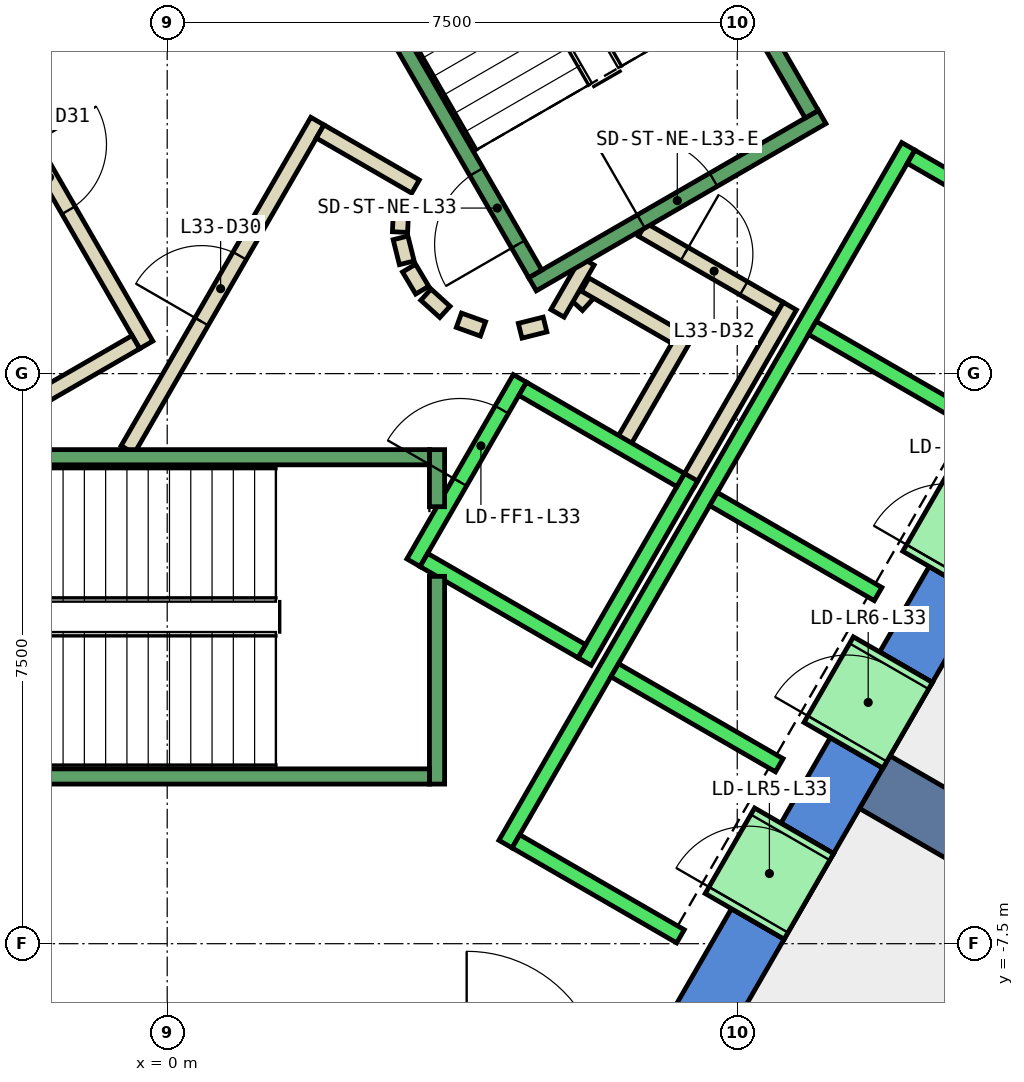
"""IFC4 building model, lengths in metres.
Left out: names, types, materials, properties, quantities, classifications, styles, units other than length and angle.
Written with IfcOpenShell. Run it as: python <this file> out.ifc"""

import sys

from ifc_helpers import new_model, si_unit, direction, frame, frame_2d, origin, place, context, subcontext, project, spatial, polyline, rectangle, outline, extrude, element, fill, save


model = new_model("IFC4")
c1 = context("Model", 3, precision=1e-05, world=origin(), true_north=direction((0.0, 1.0)))
c2 = subcontext(c1, "Body", "Model", "MODEL_VIEW")
j1 = project(units=[si_unit("LENGTHUNIT", "METRE"), si_unit("PLANEANGLEUNIT", "RADIAN")], contexts=[c1])
p1 = place(None, origin())
s1 = spatial("IfcSite", under=j1, at=p1, CompositionType="ELEMENT")
p2 = place(p1, origin())
s2 = spatial("IfcBuilding", under=s1, at=p2, CompositionType="ELEMENT")
p3 = place(p2, frame((0.0, 0.0, 150.8)))
s3 = spatial("IfcBuildingStorey", under=s2, at=p3, CompositionType="ELEMENT", Elevation=150.8)
p4 = place(p3, frame((0.0, 0.0, -0.4)))
e1 = element("IfcWall", 1, at=p4, inside=s3, PredefinedType="SHEAR", context=c2, shape_type="SweptSolid", body=[
    extrude(outline(polyline([(8.517, 11.748), (7.824, 11.348), (12.933, 2.5), (13.856, 2.5), (8.517, 11.748)])), origin(), (0.0, 0.0, 1.0), 4.2),
])
p5 = place(p3, frame((0.0, 0.0, -0.4)))
e2 = element("IfcWall", 2, at=p5, inside=s3, PredefinedType="SHEAR", context=c2, shape_type="SweptSolid", body=[
    extrude(outline(polyline([(8.117, -7.44), (7.424, -7.04), (6.466, -8.7), (6.928, -9.5), (8.117, -7.44)])), origin(), (0.0, 0.0, 1.0), 4.2),
])
p6 = place(p3, frame((0.0, 0.0, -0.4)))
e3 = element("IfcWall", 3, at=p6, inside=s3, PredefinedType="SHEAR", context=c2, shape_type="SweptSolid", body=[
    extrude(outline(polyline([(9.417, -5.189), (8.724, -4.789), (8.075, -5.914), (8.767, -6.314), (9.417, -5.189)])), origin(), (0.0, 0.0, 1.0), 4.2),
])
p7 = place(p3, frame((0.0, 0.0, -0.4)))
e4 = element("IfcWall", 4, at=p7, inside=s3, PredefinedType="SHEAR", context=c2, shape_type="SweptSolid", body=[
    extrude(outline(polyline([(10.717, -2.937), (10.025, -2.537), (9.374, -3.663), (10.067, -4.063), (10.717, -2.937)])), origin(), (0.0, 0.0, 1.0), 4.2),
])
p8 = place(p3, frame((0.0, 0.0, 3.6)))
e5 = element("IfcWall", 5, at=p8, inside=s3, PredefinedType="SHEAR", context=c2, shape_type="SweptSolid", body=[
    extrude(outline(polyline([(8.767, -6.314), (8.075, -5.914), (7.424, -7.04), (8.117, -7.44), (8.767, -6.314)])), origin(), (0.0, 0.0, 1.0), 0.2),
])
p9 = place(p3, frame((0.0, 0.0, 3.6)))
e6 = element("IfcWall", 6, at=p9, inside=s3, PredefinedType="SHEAR", context=c2, shape_type="SweptSolid", body=[
    extrude(outline(polyline([(10.067, -4.063), (9.374, -3.663), (8.724, -4.789), (9.417, -5.189), (10.067, -4.063)])), origin(), (0.0, 0.0, 1.0), 0.2),
])
p10 = place(p3, frame((0.0, 0.0, 3.6)))
e7 = element("IfcWall", 7, at=p10, inside=s3, PredefinedType="SHEAR", context=c2, shape_type="SweptSolid", body=[
    extrude(outline(polyline([(11.367, -1.811), (10.675, -1.411), (10.025, -2.537), (10.717, -2.937), (11.367, -1.811)])), origin(), (0.0, 0.0, 1.0), 0.2),
])
p11 = place(p3, frame((9.31, -5.375, -0.4), z_axis=(0.0, 0.0, 1.0), x_axis=(0.866017533419, -0.500013631625, 0.0)))
e8 = element("IfcWall", 8, at=p11, inside=s3, PredefinedType="SHEAR", context=c2, shape_type="SweptSolid", body=[
    extrude(rectangle(XDim=9.0, YDim=0.8, at=frame_2d((4.5, 0.0))), origin(), (0.0, 0.0, 1.0), 4.2),
])
p12 = place(p3, frame((5.39, 0.898, 0.0), z_axis=(0.0, 0.0, 1.0), x_axis=(0.673828488714, 0.738887791073, 0.0)))
e9 = element("IfcWall", 9, at=p12, inside=s3, PredefinedType="PARTITIONING", context=c2, shape_type="SweptSolid", body=[
    extrude(rectangle(XDim=0.263, YDim=0.2, at=frame_2d((0.131, 0.0))), origin(), (0.0, 0.0, 1.0), 3.8),
])
p13 = place(p3, frame((5.499, 1.172, 0.0), z_axis=(0.0, 0.0, 1.0), x_axis=(0.866333505267, -0.499465972466, 0.0)))
e10 = element("IfcWall", 10, at=p13, inside=s3, PredefinedType="PARTITIONING", context=c2, shape_type="SweptSolid", body=[
    extrude(rectangle(XDim=1.374, YDim=0.2, at=frame_2d((0.687, 0.0))), origin(), (0.0, 0.0, 1.0), 3.8),
])
p14 = place(p3, frame((6.826, 0.522, 0.0), z_axis=(0.0, 0.0, 1.0), x_axis=(-0.500016722714, -0.866015748706, 0.0)))
e11 = element("IfcWall", 11, at=p14, inside=s3, PredefinedType="PARTITIONING", context=c2, shape_type="SweptSolid", body=[
    extrude(rectangle(XDim=1.7, YDim=0.2, at=frame_2d((0.85, 0.0))), origin(), (0.0, 0.0, 1.0), 3.8),
])
p15 = place(p3, frame((6.25, 1.894, 0.0), z_axis=(0.0, 0.0, 1.0), x_axis=(0.866043184279, -0.499969202016, 0.0)))
e12 = element("IfcWall", 12, at=p15, inside=s3, PredefinedType="PARTITIONING", context=c2, shape_type="SweptSolid", body=[
    extrude(rectangle(XDim=2.084, YDim=0.2, at=frame_2d((1.042, 0.0))), origin(), (0.0, 0.0, 1.0), 3.8),
])
p16 = place(p15, frame((0.642, 0.0, 0.0)))
e13 = element("IfcOpeningElement", 13, at=p16, cuts=e12, PredefinedType="OPENING", context=c2, shape_type="SweptSolid", body=[
    extrude(rectangle(XDim=0.9, YDim=2.1, at=frame_2d((0.45, 1.05))), frame((0.0, 0.11, 0.0), z_axis=(0.0, -1.0, 0.0), x_axis=(1.0, 0.0, 0.0)), (0.0, 0.0, 1.0), 0.22),
])
p17 = place(p3, frame((8.192, 0.888, 0.0), z_axis=(0.0, 0.0, 1.0), x_axis=(-0.499940625693, -0.866059680843, 0.0)))
e14 = element("IfcWall", 14, at=p17, inside=s3, PredefinedType="PARTITIONING", context=c2, shape_type="SweptSolid", body=[
    extrude(rectangle(XDim=2.68, YDim=0.2, at=frame_2d((1.34, 0.0))), origin(), (0.0, 0.0, 1.0), 3.8),
])
p18 = place(p3, frame((5.135, 0.793, 0.0), z_axis=(0.0, 0.0, 1.0), x_axis=(0.499526442893, 0.866298639529, 0.0)))
e15 = element("IfcWall", 15, at=p18, inside=s3, PredefinedType="PARTITIONING", context=c2, shape_type="SweptSolid", body=[
    extrude(rectangle(XDim=0.791, YDim=0.2, at=frame_2d((0.396, 0.0))), origin(), (0.0, 0.0, 1.0), 3.8),
])
p19 = place(p3, frame((-0.52, -1.0, 0.0), z_axis=(0.0, 0.0, 1.0), x_axis=(0.50011622646, 0.865958290007, 0.0)))
e16 = element("IfcWall", 16, at=p19, inside=s3, PredefinedType="PARTITIONING", context=c2, shape_type="SweptSolid", body=[
    extrude(rectangle(XDim=4.991, YDim=0.2, at=frame_2d((2.496, 0.0))), origin(), (0.0, 0.0, 1.0), 3.8),
])
p20 = place(p19, frame((1.945, 0.0, 0.0)))
e17 = element("IfcOpeningElement", 17, at=p20, cuts=e16, PredefinedType="OPENING", context=c2, shape_type="SweptSolid", body=[
    extrude(rectangle(XDim=1.0, YDim=2.1, at=frame_2d((0.5, 1.05))), frame((0.0, 0.11, 0.0), z_axis=(0.0, -1.0, 0.0), x_axis=(1.0, 0.0, 0.0)), (0.0, 0.0, 1.0), 0.22),
])
p21 = place(p3, frame((2.012, 3.186, 0.0), z_axis=(0.0, 0.0, 1.0), x_axis=(0.865891012941, -0.500232699559, 0.0)))
e18 = element("IfcWall", 18, at=p21, inside=s3, PredefinedType="PARTITIONING", context=c2, shape_type="SweptSolid", body=[
    extrude(rectangle(XDim=1.449, YDim=0.2, at=frame_2d((0.725, 0.0))), origin(), (0.0, 0.0, 1.0), 3.8),
])
p22 = place(p3, frame((3.079, 2.199, 0.0), z_axis=(0.0, 0.0, 1.0), x_axis=(-0.047771483479, -0.998858290933, 0.0)))
e19 = element("IfcWall", 19, at=p22, inside=s3, PredefinedType="PARTITIONING", context=c2, shape_type="SweptSolid", body=[
    extrude(rectangle(XDim=0.337, YDim=0.2, at=frame_2d((0.169, 0.0))), origin(), (0.0, 0.0, 1.0), 3.8),
])
p23 = place(p3, frame((3.07, 1.786, 0.0), z_axis=(0.0, 0.0, 1.0), x_axis=(0.242705583207, -0.970099994784, 0.0)))
e20 = element("IfcWall", 20, at=p23, inside=s3, PredefinedType="PARTITIONING", context=c2, shape_type="SweptSolid", body=[
    extrude(rectangle(XDim=0.338, YDim=0.2, at=frame_2d((0.169, 0.0))), origin(), (0.0, 0.0, 1.0), 3.8),
])
for number, where, z_axis, x_axis in (
    (21, (3.182, 1.388, 0.0), (0.0, 0.0, 1.0), (0.512, -0.859, 0.0)),
    (22, (3.404, 1.039, 0.0), (0.0, 0.0, 1.0), (0.74, -0.672, 0.0)),
):
    element("IfcWall", number, at=place(p3, frame(where, z_axis=z_axis, x_axis=x_axis)), inside=s3, PredefinedType="PARTITIONING", context=c2, shape_type="SweptSolid", body=[
        extrude(rectangle(XDim=0.338, YDim=0.2, at=frame_2d((0.169, 0.0))), origin(), (0.0, 0.0, 1.0), 3.8),
    ])
p24 = place(p3, frame((3.838, 0.702, 0.0), z_axis=(0.0, 0.0, 1.0), x_axis=(0.941035081519, -0.338308993895, 0.0)))
e23 = element("IfcWall", 23, at=p24, inside=s3, PredefinedType="PARTITIONING", context=c2, shape_type="SweptSolid", body=[
    extrude(rectangle(XDim=0.337, YDim=0.2, at=frame_2d((0.168, 0.0))), origin(), (0.0, 0.0, 1.0), 3.8),
])
p25 = place(p3, frame((4.644, 0.564, 0.0), z_axis=(0.0, 0.0, 1.0), x_axis=(0.969929076366, 0.243387729394, 0.0)))
e24 = element("IfcWall", 24, at=p25, inside=s3, PredefinedType="PARTITIONING", context=c2, shape_type="SweptSolid", body=[
    extrude(rectangle(XDim=0.337, YDim=0.2, at=frame_2d((0.168, 0.0))), origin(), (0.0, 0.0, 1.0), 3.8),
])
p26 = place(p3, frame((-2.771, 4.7, 0.0), z_axis=(0.0, 0.0, 1.0), x_axis=(0.499969479948, -0.866043023828, 0.0)))
e25 = element("IfcWall", 25, at=p26, inside=s3, PredefinedType="PARTITIONING", context=c2, shape_type="SweptSolid", body=[
    extrude(rectangle(XDim=4.99, YDim=0.2, at=frame_2d((2.495, 0.0))), origin(), (0.0, 0.0, 1.0), 3.8),
])
p27 = place(p26, frame((1.945, 0.0, 0.0)))
e26 = element("IfcOpeningElement", 26, at=p27, cuts=e25, PredefinedType="OPENING", context=c2, shape_type="SweptSolid", body=[
    extrude(rectangle(XDim=1.0, YDim=2.1, at=frame_2d((0.5, 1.05))), frame((0.0, 0.11, 0.0), z_axis=(0.0, -1.0, 0.0), x_axis=(1.0, 0.0, 0.0)), (0.0, 0.0, 1.0), 0.22),
])
p28 = place(p3, frame((-0.412, 0.414, 0.0), z_axis=(0.0, 0.0, 1.0), x_axis=(-0.866017369001, -0.500013916395, 0.0)))
e27 = element("IfcWall", 27, at=p28, inside=s3, PredefinedType="PARTITIONING", context=c2, shape_type="SweptSolid", body=[
    extrude(rectangle(XDim=1.45, YDim=0.2, at=frame_2d((0.725, 0.0))), origin(), (0.0, 0.0, 1.0), 3.8),
])
p29 = place(p3, frame((12.401, -7.621, 0.0), z_axis=(0.0, 0.0, 1.0), x_axis=(-0.499983724212, -0.866034800411, 0.0)))
e28 = element("IfcWall", 28, at=p29, inside=s3, PredefinedType="PARTITIONING", context=c2, shape_type="SweptSolid", body=[
    extrude(rectangle(XDim=9.302, YDim=0.2, at=frame_2d((4.651, 0.0))), origin(), (0.0, 0.0, 1.0), 3.8),
])
p30 = place(p3, frame((3.24, -2.488, 0.0), z_axis=(0.0, 0.0, 1.0), x_axis=(0.49994636267, 0.866056369097, 0.0)))
e29 = element("IfcWall", 29, at=p30, inside=s3, PredefinedType="STANDARD", context=c2, shape_type="SweptSolid", body=[
    extrude(rectangle(XDim=2.8, YDim=0.2, at=frame_2d((1.4, 0.0))), origin(), (0.0, 0.0, 1.0), 3.8),
])
p31 = place(p30, frame((1.225, 0.0, 0.0)))
e30 = element("IfcOpeningElement", 30, at=p31, cuts=e29, PredefinedType="OPENING", context=c2, shape_type="SweptSolid", body=[
    extrude(rectangle(XDim=1.1, YDim=2.1, at=frame_2d((0.55, 1.05))), frame((0.0, 0.11, 0.0), z_axis=(0.0, -1.0, 0.0), x_axis=(1.0, 0.0, 0.0)), (0.0, 0.0, 1.0), 0.22),
])
p32 = place(p3, frame((5.492, -3.788, 0.0), z_axis=(0.0, 0.0, 1.0), x_axis=(0.500011755427, 0.866018616679, 0.0)))
e31 = element("IfcWall", 31, at=p32, inside=s3, PredefinedType="STANDARD", context=c2, shape_type="SweptSolid", body=[
    extrude(rectangle(XDim=2.8, YDim=0.2, at=frame_2d((1.4, 0.0))), origin(), (0.0, 0.0, 1.0), 3.8),
])
p33 = place(p3, frame((3.377, -2.452, 0.0), z_axis=(0.0, 0.0, 1.0), x_axis=(0.865955154139, -0.50012165622, 0.0)))
e32 = element("IfcWall", 32, at=p33, inside=s3, PredefinedType="STANDARD", context=c2, shape_type="SweptSolid", body=[
    extrude(rectangle(XDim=2.4, YDim=0.2, at=frame_2d((1.2, 0.0))), origin(), (0.0, 0.0, 1.0), 3.8),
])
p34 = place(p3, frame((4.677, -0.2, 0.0), z_axis=(0.0, 0.0, 1.0), x_axis=(0.865973769406, -0.500089422704, 0.0)))
e33 = element("IfcWall", 33, at=p34, inside=s3, PredefinedType="STANDARD", context=c2, shape_type="SweptSolid", body=[
    extrude(rectangle(XDim=2.399, YDim=0.2, at=frame_2d((1.2, 0.0))), origin(), (0.0, 0.0, 1.0), 3.8),
])
p35 = place(p3, frame((4.451, -6.19, 0.0), z_axis=(0.0, 0.0, 1.0), x_axis=(0.50000090737, 0.866024879913, 0.0)))
e34 = element("IfcWall", 34, at=p35, inside=s3, PredefinedType="STANDARD", context=c2, shape_type="SweptSolid", body=[
    extrude(rectangle(XDim=10.6, YDim=0.2, at=frame_2d((5.3, 0.0))), origin(), (0.0, 0.0, 1.0), 3.8),
])
for number, where, z_axis, x_axis in (
    (35, (4.588, -6.153, 0.0), (0.0, 0.0, 1.0), (0.866, -0.5, 0.0)),
    (36, (5.888, -3.902, 0.0), (0.0, 0.0, 1.0), (0.866, -0.5, 0.0)),
    (37, (7.188, -1.65, 0.0), (0.0, 0.0, 1.0), (0.866, -0.5, 0.0)),
    (38, (8.488, 0.602, 0.0), (0.0, 0.0, 1.0), (0.866, -0.5, 0.0)),
):
    element("IfcWall", number, at=place(p3, frame(where, z_axis=z_axis, x_axis=x_axis)), inside=s3, PredefinedType="STANDARD", context=c2, shape_type="SweptSolid", body=[
        extrude(rectangle(XDim=2.5, YDim=0.2, at=frame_2d((1.25, 0.0))), origin(), (0.0, 0.0, 1.0), 3.8),
    ])
p36 = place(p3, frame((9.788, 2.853, 0.0), z_axis=(0.0, 0.0, 1.0), x_axis=(0.865998541277, -0.500046524342, 0.0)))
e39 = element("IfcWall", 39, at=p36, inside=s3, PredefinedType="STANDARD", context=c2, shape_type="SweptSolid", body=[
    extrude(rectangle(XDim=2.5, YDim=0.2, at=frame_2d((1.25, 0.0))), origin(), (0.0, 0.0, 1.0), 3.8),
])
p37 = place(p3, frame((7.598, -7.14, 0.0), z_axis=(0.0, 0.0, 1.0), x_axis=(0.500362116554, 0.865816234728, 0.0)))
e40 = element("IfcWall", 40, at=p37, inside=s3, PredefinedType="STANDARD", context=c2, shape_type="SweptSolid", body=[
    extrude(rectangle(XDim=1.299, YDim=1.2, at=frame_2d((0.65, 0.0))), origin(), (0.0, 0.0, 1.0), 2.4),
])
p38 = place(p37, frame((0.1, 0.0, 0.0)))
e41 = element("IfcOpeningElement", 41, at=p38, cuts=e40, PredefinedType="OPENING", context=c2, shape_type="SweptSolid", body=[
    extrude(rectangle(XDim=1.1, YDim=2.3, at=frame_2d((0.55, 1.15))), frame((0.0, 0.61, 0.0), z_axis=(0.0, -1.0, 0.0), x_axis=(1.0, 0.0, 0.0)), (0.0, 0.0, 1.0), 1.22),
])
p39 = place(p3, frame((8.898, -4.889, 0.0), z_axis=(0.0, 0.0, 1.0), x_axis=(0.500036693733, 0.866004217611, 0.0)))
e42 = element("IfcWall", 42, at=p39, inside=s3, PredefinedType="STANDARD", context=c2, shape_type="SweptSolid", body=[
    extrude(rectangle(XDim=1.3, YDim=1.2, at=frame_2d((0.65, 0.0))), origin(), (0.0, 0.0, 1.0), 2.4),
])
p40 = place(p39, frame((0.1, 0.0, 0.0)))
e43 = element("IfcOpeningElement", 43, at=p40, cuts=e42, PredefinedType="OPENING", context=c2, shape_type="SweptSolid", body=[
    extrude(rectangle(XDim=1.1, YDim=2.3, at=frame_2d((0.55, 1.15))), frame((0.0, 0.61, 0.0), z_axis=(0.0, -1.0, 0.0), x_axis=(1.0, 0.0, 0.0)), (0.0, 0.0, 1.0), 1.22),
])
p41 = place(p3, frame((10.198, -2.637, 0.0), z_axis=(0.0, 0.0, 1.0), x_axis=(0.49989585183, 0.866085525409, 0.0)))
e44 = element("IfcWall", 44, at=p41, inside=s3, PredefinedType="STANDARD", context=c2, shape_type="SweptSolid", body=[
    extrude(rectangle(XDim=1.3, YDim=1.2, at=frame_2d((0.65, 0.0))), origin(), (0.0, 0.0, 1.0), 2.4),
])
p42 = place(p41, frame((0.1, 0.0, 0.0)))
e45 = element("IfcOpeningElement", 45, at=p42, cuts=e44, PredefinedType="OPENING", context=c2, shape_type="SweptSolid", body=[
    extrude(rectangle(XDim=1.1, YDim=2.3, at=frame_2d((0.55, 1.15))), frame((0.0, 0.61, 0.0), z_axis=(0.0, -1.0, 0.0), x_axis=(1.0, 0.0, 0.0)), (0.0, 0.0, 1.0), 1.22),
])
p43 = place(p3, frame((3.55, -2.667, 0.0), z_axis=(0.0, 0.0, 1.0), x_axis=(0.0, -1.0, 0.0)))
e46 = element("IfcWall", 46, at=p43, inside=s3, PredefinedType="STANDARD", context=c2, shape_type="SweptSolid", body=[
    extrude(rectangle(XDim=2.733, YDim=0.2, at=frame_2d((1.366, 0.0))), origin(), (0.0, 0.0, 1.0), 3.8),
])
p44 = place(p3, frame((3.55, -1.0, 0.0), z_axis=(0.0, 0.0, 1.0), x_axis=(0.0, -1.0, 0.0)))
e47 = element("IfcWall", 47, at=p44, inside=s3, PredefinedType="STANDARD", context=c2, shape_type="SweptSolid", body=[
    extrude(rectangle(XDim=0.751, YDim=0.2, at=frame_2d((0.375, 0.0))), origin(), (0.0, 0.0, 1.0), 3.8),
])
p45 = place(p3, frame((-3.45, -1.1, 0.0), z_axis=(0.0, 0.0, 1.0), x_axis=(1.0, 0.0, 0.0)))
e48 = element("IfcWall", 48, at=p45, inside=s3, PredefinedType="STANDARD", context=c2, shape_type="SweptSolid", body=[
    extrude(rectangle(XDim=6.9, YDim=0.2, at=frame_2d((3.45, 0.0))), origin(), (0.0, 0.0, 1.0), 3.8),
])
p46 = place(p45, frame((0.45, 0.0, 0.0)))
e49 = element("IfcOpeningElement", 49, at=p46, cuts=e48, PredefinedType="OPENING", context=c2, shape_type="SweptSolid", body=[
    extrude(rectangle(XDim=1.1, YDim=2.2, at=frame_2d((0.55, 1.1))), frame((0.0, 0.11, 0.0), z_axis=(0.0, -1.0, 0.0), x_axis=(1.0, 0.0, 0.0)), (0.0, 0.0, 1.0), 0.22),
])
p47 = place(p3, frame((-3.45, -5.3, 0.0), z_axis=(0.0, 0.0, 1.0), x_axis=(1.0, 0.0, 0.0)))
e50 = element("IfcWall", 50, at=p47, inside=s3, PredefinedType="STANDARD", context=c2, shape_type="SweptSolid", body=[
    extrude(rectangle(XDim=6.9, YDim=0.2, at=frame_2d((3.45, 0.0))), origin(), (0.0, 0.0, 1.0), 3.8),
])
p48 = place(p3, frame((4.806, 1.176, 0.0), z_axis=(0.0, 0.0, 1.0), x_axis=(0.866059941101, 0.499940174841, 0.0)))
e51 = element("IfcWall", 51, at=p48, inside=s3, PredefinedType="STANDARD", context=c2, shape_type="SweptSolid", body=[
    extrude(rectangle(XDim=4.4, YDim=0.2, at=frame_2d((2.2, 0.0))), origin(), (0.0, 0.0, 1.0), 3.8),
])
p49 = place(p48, frame((1.65, 0.0, 0.0)))
e52 = element("IfcOpeningElement", 52, at=p49, cuts=e51, PredefinedType="OPENING", context=c2, shape_type="SweptSolid", body=[
    extrude(rectangle(XDim=1.1, YDim=2.2, at=frame_2d((0.55, 1.1))), frame((0.0, 0.11, 0.0), z_axis=(0.0, -1.0, 0.0), x_axis=(1.0, 0.0, 0.0)), (0.0, 0.0, 1.0), 0.22),
])
p50 = place(p3, frame((4.843, 1.312, 0.0), z_axis=(0.0, 0.0, 1.0), x_axis=(-0.499963383562, 0.866046543262, 0.0)))
e53 = element("IfcWall", 53, at=p50, inside=s3, PredefinedType="STANDARD", context=c2, shape_type="SweptSolid", body=[
    extrude(rectangle(XDim=6.9, YDim=0.2, at=frame_2d((3.45, 0.0))), origin(), (0.0, 0.0, 1.0), 3.8),
])
p51 = place(p50, frame((0.45, 0.0, 0.0)))
e54 = element("IfcOpeningElement", 54, at=p51, cuts=e53, PredefinedType="OPENING", context=c2, shape_type="SweptSolid", body=[
    extrude(rectangle(XDim=1.1, YDim=2.2, at=frame_2d((0.55, 1.1))), frame((0.0, 0.11, 0.0), z_axis=(0.0, -1.0, 0.0), x_axis=(1.0, 0.0, 0.0)), (0.0, 0.0, 1.0), 0.22),
])
p52 = place(p3, frame((8.48, 3.412, 0.0), z_axis=(0.0, 0.0, 1.0), x_axis=(-0.499978703459, 0.866037698999, 0.0)))
e55 = element("IfcWall", 55, at=p52, inside=s3, PredefinedType="STANDARD", context=c2, shape_type="SweptSolid", body=[
    extrude(rectangle(XDim=6.9, YDim=0.2, at=frame_2d((3.45, 0.0))), origin(), (0.0, 0.0, 1.0), 3.8),
])
p53 = place(p3, frame((-1.393, 7.288, 0.0), z_axis=(0.0, 0.0, 1.0), x_axis=(-0.499963383562, -0.866046543262, 0.0)))
e56 = element("IfcWall", 56, at=p53, inside=s3, PredefinedType="STANDARD", context=c2, shape_type="SweptSolid", body=[
    extrude(rectangle(XDim=6.9, YDim=0.2, at=frame_2d((3.45, 0.0))), origin(), (0.0, 0.0, 1.0), 3.8),
])
p54 = place(p53, frame((0.45, 0.0, 0.0)))
e57 = element("IfcOpeningElement", 57, at=p54, cuts=e56, PredefinedType="OPENING", context=c2, shape_type="SweptSolid", body=[
    extrude(rectangle(XDim=1.1, YDim=2.2, at=frame_2d((0.55, 1.1))), frame((0.0, 0.11, 0.0), z_axis=(0.0, -1.0, 0.0), x_axis=(1.0, 0.0, 0.0)), (0.0, 0.0, 1.0), 0.22),
])
p55 = place(p20, origin())
e58 = element("IfcDoor", 58, at=p55, inside=s3, OperationType="SINGLE_SWING_LEFT", PredefinedType="DOOR", context=c2, shape_type="SweptSolid", body=[
    extrude(rectangle(XDim=1.0, YDim=2.1, at=frame_2d((0.5, 1.05))), frame((0.0, 0.025, 0.0), z_axis=(0.0, -1.0, 0.0), x_axis=(1.0, 0.0, 0.0)), (0.0, 0.0, 1.0), 0.05),
])
fill(e17, e58)
p56 = place(p27, origin())
e59 = element("IfcDoor", 59, at=p56, inside=s3, OperationType="SINGLE_SWING_RIGHT", PredefinedType="DOOR", context=c2, shape_type="SweptSolid", body=[
    extrude(rectangle(XDim=1.0, YDim=2.1, at=frame_2d((0.5, 1.05))), frame((0.0, 0.025, 0.0), z_axis=(0.0, -1.0, 0.0), x_axis=(1.0, 0.0, 0.0)), (0.0, 0.0, 1.0), 0.05),
])
fill(e26, e59)
p57 = place(p16, origin())
e60 = element("IfcDoor", 60, at=p57, inside=s3, OperationType="SINGLE_SWING_LEFT", PredefinedType="DOOR", context=c2, shape_type="SweptSolid", body=[
    extrude(rectangle(XDim=0.9, YDim=2.1, at=frame_2d((0.45, 1.05))), frame((0.0, 0.025, 0.0), z_axis=(0.0, -1.0, 0.0), x_axis=(1.0, 0.0, 0.0)), (0.0, 0.0, 1.0), 0.05),
])
fill(e13, e60)
p58 = place(p38, origin())
e61 = element("IfcDoor", 61, at=p58, inside=s3, OperationType="SLIDING_TO_LEFT", PredefinedType="DOOR", context=c2, shape_type="SweptSolid", body=[
    extrude(rectangle(XDim=1.1, YDim=2.3, at=frame_2d((0.55, 1.15))), frame((0.0, 0.025, 0.0), z_axis=(0.0, -1.0, 0.0), x_axis=(1.0, 0.0, 0.0)), (0.0, 0.0, 1.0), 0.05),
])
fill(e41, e61)
p59 = place(p40, origin())
e62 = element("IfcDoor", 62, at=p59, inside=s3, OperationType="SLIDING_TO_LEFT", PredefinedType="DOOR", context=c2, shape_type="SweptSolid", body=[
    extrude(rectangle(XDim=1.1, YDim=2.3, at=frame_2d((0.55, 1.15))), frame((0.0, 0.025, 0.0), z_axis=(0.0, -1.0, 0.0), x_axis=(1.0, 0.0, 0.0)), (0.0, 0.0, 1.0), 0.05),
])
fill(e43, e62)
p60 = place(p31, origin())
e63 = element("IfcDoor", 63, at=p60, inside=s3, OperationType="SLIDING_TO_LEFT", PredefinedType="DOOR", context=c2, shape_type="SweptSolid", body=[
    extrude(rectangle(XDim=1.1, YDim=2.1, at=frame_2d((0.55, 1.05))), frame((0.0, 0.025, 0.0), z_axis=(0.0, -1.0, 0.0), x_axis=(1.0, 0.0, 0.0)), (0.0, 0.0, 1.0), 0.05),
])
fill(e30, e63)
p61 = place(p51, origin())
e64 = element("IfcDoor", 64, at=p61, inside=s3, OperationType="SINGLE_SWING_LEFT", PredefinedType="DOOR", context=c2, shape_type="SweptSolid", body=[
    extrude(rectangle(XDim=1.1, YDim=2.2, at=frame_2d((0.55, 1.1))), frame((0.0, 0.025, 0.0), z_axis=(0.0, -1.0, 0.0), x_axis=(1.0, 0.0, 0.0)), (0.0, 0.0, 1.0), 0.05),
])
fill(e54, e64)
p62 = place(p49, origin())
e65 = element("IfcDoor", 65, at=p62, inside=s3, OperationType="SINGLE_SWING_LEFT", PredefinedType="DOOR", context=c2, shape_type="SweptSolid", body=[
    extrude(rectangle(XDim=1.1, YDim=2.2, at=frame_2d((0.55, 1.1))), frame((0.0, 0.025, 0.0), z_axis=(0.0, -1.0, 0.0), x_axis=(1.0, 0.0, 0.0)), (0.0, 0.0, 1.0), 0.05),
])
fill(e52, e65)
save(model, sys.argv[1])
